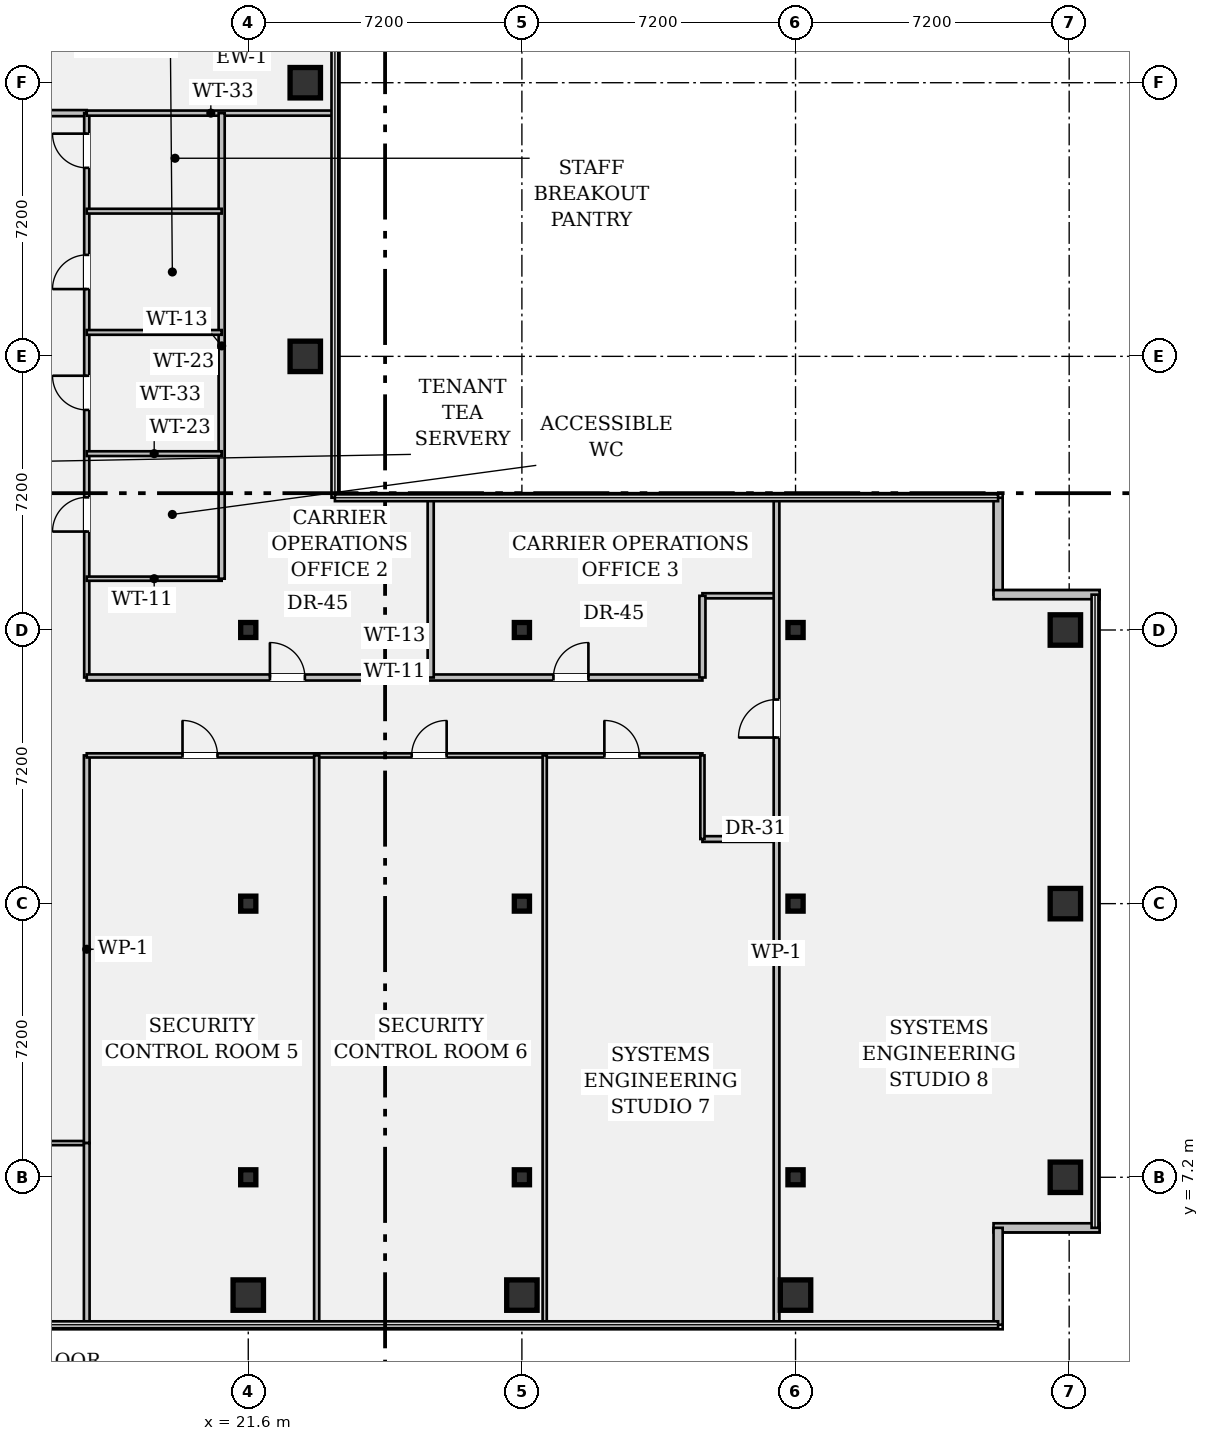
"""IFC4 building model, lengths in metres.
Left out: names, types, materials, properties, quantities, classifications, styles, units other than length and angle.
Written with IfcOpenShell. Run it as: python <this file> out.ifc"""

import sys

from ifc_helpers import new_model, si_unit, direction, frame, frame_2d, origin, origin_2d, place, context, subcontext, project, spatial, rectangle, hollow_rectangle, i_section, extrude, element, fill, save


model = new_model("IFC4")
c1 = context("Model", 3, precision=1e-05, world=origin(), true_north=direction((0.0, 1.0)))
c2 = subcontext(c1, "Body", "Model", "MODEL_VIEW")
j1 = project(units=[si_unit("LENGTHUNIT", "METRE"), si_unit("PLANEANGLEUNIT", "RADIAN")], contexts=[c1])
p1 = place(None, origin())
s1 = spatial("IfcSite", under=j1, at=p1, CompositionType="ELEMENT")
p2 = place(p1, origin())
s2 = spatial("IfcBuilding", under=s1, at=p2, CompositionType="ELEMENT")
p3 = place(p2, frame((0.0, 0.0, 187.25)))
s3 = spatial("IfcBuildingStorey", under=s2, at=p3, CompositionType="ELEMENT", Elevation=187.25)
p4 = place(p3, frame((21.6, 4.1, 0.0), z_axis=(0.0, 0.0, 1.0), x_axis=(1.0, 0.0, 0.0)))
e1 = element("IfcColumn", 1, at=p4, inside=s3, PredefinedType="COLUMN", context=c2, shape_type="SweptSolid", body=[
    extrude(hollow_rectangle(XDim=0.8, YDim=0.8, WallThickness=0.05, at=origin_2d()), origin(), (0.0, 0.0, 1.0), 3.24),
])
for number, where, z_axis, x_axis in (
    (2, (21.6, 7.2, 0.0), (0.0, 0.0, 1.0), (1.0, 0.0, 0.0)),
    (3, (21.6, 14.4, 0.0), (0.0, 0.0, 1.0), (1.0, 0.0, 0.0)),
    (4, (21.6, 21.6, 0.0), (0.0, 0.0, 1.0), (1.0, 0.0, 0.0)),
):
    element("IfcColumn", number, at=place(p3, frame(where, z_axis=z_axis, x_axis=x_axis)), inside=s3, PredefinedType="COLUMN", context=c2, shape_type="SweptSolid", body=[
        extrude(i_section(OverallWidth=0.399, OverallDepth=0.394, WebThickness=0.023, FlangeThickness=0.037, FilletRadius=0.018, at=origin_2d()), origin(), (0.0, 0.0, 1.0), 3.24),
    ])
for number, where, z_axis, x_axis in (
    (5, (23.1, 28.8, 0.0), (0.0, 0.0, 1.0), (1.0, 0.0, 0.0)),
    (6, (23.1, 36.0, 0.0), (0.0, 0.0, 1.0), (1.0, 0.0, 0.0)),
    (7, (28.8, 4.1, 0.0), (0.0, 0.0, 1.0), (1.0, 0.0, 0.0)),
):
    element("IfcColumn", number, at=place(p3, frame(where, z_axis=z_axis, x_axis=x_axis)), inside=s3, PredefinedType="COLUMN", context=c2, shape_type="SweptSolid", body=[
        extrude(hollow_rectangle(XDim=0.8, YDim=0.8, WallThickness=0.05, at=origin_2d()), origin(), (0.0, 0.0, 1.0), 3.24),
    ])
for number, where, z_axis, x_axis in (
    (8, (28.8, 7.2, 0.0), (0.0, 0.0, 1.0), (1.0, 0.0, 0.0)),
    (9, (28.8, 14.4, 0.0), (0.0, 0.0, 1.0), (1.0, 0.0, 0.0)),
    (10, (28.8, 21.6, 0.0), (0.0, 0.0, 1.0), (1.0, 0.0, 0.0)),
):
    element("IfcColumn", number, at=place(p3, frame(where, z_axis=z_axis, x_axis=x_axis)), inside=s3, PredefinedType="COLUMN", context=c2, shape_type="SweptSolid", body=[
        extrude(i_section(OverallWidth=0.399, OverallDepth=0.394, WebThickness=0.023, FlangeThickness=0.037, FilletRadius=0.018, at=origin_2d()), origin(), (0.0, 0.0, 1.0), 3.24),
    ])
p5 = place(p3, frame((36.0, 4.1, 0.0), z_axis=(0.0, 0.0, 1.0), x_axis=(1.0, 0.0, 0.0)))
e11 = element("IfcColumn", 11, at=p5, inside=s3, PredefinedType="COLUMN", context=c2, shape_type="SweptSolid", body=[
    extrude(hollow_rectangle(XDim=0.8, YDim=0.8, WallThickness=0.05, at=origin_2d()), origin(), (0.0, 0.0, 1.0), 3.24),
])
for number, where, z_axis, x_axis in (
    (12, (36.0, 7.2, 0.0), (0.0, 0.0, 1.0), (1.0, 0.0, 0.0)),
    (13, (36.0, 14.4, 0.0), (0.0, 0.0, 1.0), (1.0, 0.0, 0.0)),
    (14, (36.0, 21.6, 0.0), (0.0, 0.0, 1.0), (1.0, 0.0, 0.0)),
):
    element("IfcColumn", number, at=place(p3, frame(where, z_axis=z_axis, x_axis=x_axis)), inside=s3, PredefinedType="COLUMN", context=c2, shape_type="SweptSolid", body=[
        extrude(i_section(OverallWidth=0.399, OverallDepth=0.394, WebThickness=0.023, FlangeThickness=0.037, FilletRadius=0.018, at=origin_2d()), origin(), (0.0, 0.0, 1.0), 3.24),
    ])
for number, where, z_axis, x_axis in (
    (15, (43.1, 7.2, 0.0), (0.0, 0.0, 1.0), (1.0, 0.0, 0.0)),
    (16, (43.1, 14.4, 0.0), (0.0, 0.0, 1.0), (1.0, 0.0, 0.0)),
    (17, (43.1, 21.6, 0.0), (0.0, 0.0, 1.0), (1.0, 0.0, 0.0)),
):
    element("IfcColumn", number, at=place(p3, frame(where, z_axis=z_axis, x_axis=x_axis)), inside=s3, PredefinedType="COLUMN", context=c2, shape_type="SweptSolid", body=[
        extrude(hollow_rectangle(XDim=0.8, YDim=0.8, WallThickness=0.05, at=origin_2d()), origin(), (0.0, 0.0, 1.0), 3.24),
    ])
p6 = place(p3, frame((41.33, 25.08, 0.0), z_axis=(0.0, 0.0, 1.0), x_axis=(0.0, -1.0, 0.0)))
e18 = element("IfcWall", 18, at=p6, inside=s3, PredefinedType="STANDARD", context=c2, shape_type="SweptSolid", body=[
    extrude(rectangle(XDim=2.55, YDim=0.24, at=frame_2d((1.275, 0.0))), origin(), (0.0, 0.0, 1.0), 3.24),
])
for number, where, z_axis, x_axis in (
    (19, (41.21, 22.53, 0.0), (0.0, 0.0, 1.0), (1.0, 0.0, 0.0)),
    (20, (44.0, 5.87, 0.0), (0.0, 0.0, 1.0), (-1.0, 0.0, 0.0)),
):
    element("IfcWall", number, at=place(p3, frame(where, z_axis=z_axis, x_axis=x_axis)), inside=s3, PredefinedType="STANDARD", context=c2, shape_type="SweptSolid", body=[
        extrude(rectangle(XDim=2.79, YDim=0.24, at=frame_2d((1.395, 0.0))), origin(), (0.0, 0.0, 1.0), 3.24),
    ])
p7 = place(p3, frame((41.33, 5.87, 0.0), z_axis=(0.0, 0.0, 1.0), x_axis=(0.0, -1.0, 0.0)))
e21 = element("IfcWall", 21, at=p7, inside=s3, PredefinedType="STANDARD", context=c2, shape_type="SweptSolid", body=[
    extrude(rectangle(XDim=2.55, YDim=0.24, at=frame_2d((1.275, 0.0))), origin(), (0.0, 0.0, 1.0), 3.24),
])
p8 = place(p3, frame((14.4, 8.1, 0.0), z_axis=(0.0, 0.0, 1.0), x_axis=(1.0, 0.0, 0.0)))
e22 = element("IfcWall", 22, at=p8, inside=s3, PredefinedType="PARTITIONING", context=c2, shape_type="SweptSolid", body=[
    extrude(rectangle(XDim=2.95, YDim=0.11, at=frame_2d((1.475, 0.0))), origin(), (0.0, 0.0, 1.0), 2.808),
])
p9 = place(p8, frame((0.95, 0.0, 0.0)))
e23 = element("IfcOpeningElement", 23, at=p9, cuts=e22, PredefinedType="OPENING", context=c2, shape_type="SweptSolid", body=[
    extrude(rectangle(XDim=0.92, YDim=2.15, at=frame_2d((0.46, 1.075))), frame((0.0, 0.067, 0.0), z_axis=(0.0, -1.0, 0.0), x_axis=(1.0, 0.0, 0.0)), (0.0, 0.0, 1.0), 0.134),
])
p10 = place(p3, frame((14.4, 35.2, 0.0), z_axis=(0.0, 0.0, 1.0), x_axis=(1.0, 0.0, 0.0)))
e24 = element("IfcWall", 24, at=p10, inside=s3, PredefinedType="PARTITIONING", context=c2, shape_type="SweptSolid", body=[
    extrude(rectangle(XDim=2.95, YDim=0.16, at=frame_2d((1.475, 0.0))), origin(), (0.0, 0.0, 1.0), 2.808),
])
p11 = place(p10, frame((0.95, 0.0, 0.0)))
e25 = element("IfcOpeningElement", 25, at=p11, cuts=e24, PredefinedType="OPENING", context=c2, shape_type="SweptSolid", body=[
    extrude(rectangle(XDim=1.0, YDim=2.15, at=frame_2d((0.5, 1.075))), frame((0.0, 0.092, 0.0), z_axis=(0.0, -1.0, 0.0), x_axis=(1.0, 0.0, 0.0)), (0.0, 0.0, 1.0), 0.184),
])
p12 = place(p3, frame((17.35, 8.1, 0.0), z_axis=(0.0, 0.0, 1.0), x_axis=(0.0, 1.0, 0.0)))
e26 = element("IfcWall", 26, at=p12, inside=s3, PredefinedType="PARTITIONING", context=c2, shape_type="SweptSolid", body=[
    extrude(rectangle(XDim=10.2, YDim=0.15, at=frame_2d((5.1, 0.0))), origin(), (0.0, 0.0, 1.0), 2.603),
])
p13 = place(p3, frame((17.35, 20.35, 0.0), z_axis=(0.0, 0.0, 1.0), x_axis=(0.0, 1.0, 0.0)))
e27 = element("IfcWall", 27, at=p13, inside=s3, PredefinedType="PARTITIONING", context=c2, shape_type="SweptSolid", body=[
    extrude(rectangle(XDim=14.85, YDim=0.135, at=frame_2d((7.425, 0.0))), origin(), (0.0, 0.0, 1.0), 2.603),
])
p14 = place(p13, frame((3.84, 0.0, 0.0)))
e28 = element("IfcOpeningElement", 28, at=p14, cuts=e27, PredefinedType="OPENING", context=c2, shape_type="SweptSolid", body=[
    extrude(rectangle(XDim=0.9, YDim=2.15, at=frame_2d((0.45, 1.075))), frame((0.0, 0.08, 0.0), z_axis=(0.0, -1.0, 0.0), x_axis=(1.0, 0.0, 0.0)), (0.0, 0.0, 1.0), 0.159),
])
p15 = place(p13, frame((7.04, 0.0, 0.0)))
e29 = element("IfcOpeningElement", 29, at=p15, cuts=e27, PredefinedType="OPENING", context=c2, shape_type="SweptSolid", body=[
    extrude(rectangle(XDim=0.9, YDim=2.15, at=frame_2d((0.45, 1.075))), frame((0.0, 0.08, 0.0), z_axis=(0.0, -1.0, 0.0), x_axis=(1.0, 0.0, 0.0)), (0.0, 0.0, 1.0), 0.159),
])
p16 = place(p13, frame((10.22, 0.0, 0.0)))
e30 = element("IfcOpeningElement", 30, at=p16, cuts=e27, PredefinedType="OPENING", context=c2, shape_type="SweptSolid", body=[
    extrude(rectangle(XDim=0.9, YDim=2.15, at=frame_2d((0.45, 1.075))), frame((0.0, 0.08, 0.0), z_axis=(0.0, -1.0, 0.0), x_axis=(1.0, 0.0, 0.0)), (0.0, 0.0, 1.0), 0.159),
])
p17 = place(p13, frame((13.41, 0.0, 0.0)))
e31 = element("IfcOpeningElement", 31, at=p17, cuts=e27, PredefinedType="OPENING", context=c2, shape_type="SweptSolid", body=[
    extrude(rectangle(XDim=0.9, YDim=2.15, at=frame_2d((0.45, 1.075))), frame((0.0, 0.08, 0.0), z_axis=(0.0, -1.0, 0.0), x_axis=(1.0, 0.0, 0.0)), (0.0, 0.0, 1.0), 0.159),
])
p18 = place(p3, frame((17.35, 18.3, 0.0), z_axis=(0.0, 0.0, 1.0), x_axis=(1.0, 0.0, 0.0)))
e32 = element("IfcWall", 32, at=p18, inside=s3, PredefinedType="PARTITIONING", context=c2, shape_type="SweptSolid", body=[
    extrude(rectangle(XDim=16.2, YDim=0.11, at=frame_2d((8.1, 0.0))), origin(), (0.0, 0.0, 1.0), 2.603),
])
p19 = place(p18, frame((2.52, 0.0, 0.0)))
e33 = element("IfcOpeningElement", 33, at=p19, cuts=e32, PredefinedType="OPENING", context=c2, shape_type="SweptSolid", body=[
    extrude(rectangle(XDim=0.92, YDim=2.15, at=frame_2d((0.46, 1.075))), frame((0.0, 0.067, 0.0), z_axis=(0.0, -1.0, 0.0), x_axis=(1.0, 0.0, 0.0)), (0.0, 0.0, 1.0), 0.134),
])
p20 = place(p18, frame((8.55, 0.0, 0.0)))
e34 = element("IfcOpeningElement", 34, at=p20, cuts=e32, PredefinedType="OPENING", context=c2, shape_type="SweptSolid", body=[
    extrude(rectangle(XDim=0.92, YDim=2.15, at=frame_2d((0.46, 1.075))), frame((0.0, 0.067, 0.0), z_axis=(0.0, -1.0, 0.0), x_axis=(1.0, 0.0, 0.0)), (0.0, 0.0, 1.0), 0.134),
])
p21 = place(p18, frame((13.62, 0.0, 0.0)))
e35 = element("IfcOpeningElement", 35, at=p21, cuts=e32, PredefinedType="OPENING", context=c2, shape_type="SweptSolid", body=[
    extrude(rectangle(XDim=0.92, YDim=2.15, at=frame_2d((0.46, 1.075))), frame((0.0, 0.067, 0.0), z_axis=(0.0, -1.0, 0.0), x_axis=(1.0, 0.0, 0.0)), (0.0, 0.0, 1.0), 0.134),
])
p22 = place(p3, frame((17.35, 20.35, 0.0), z_axis=(0.0, 0.0, 1.0), x_axis=(1.0, 0.0, 0.0)))
e36 = element("IfcWall", 36, at=p22, inside=s3, PredefinedType="PARTITIONING", context=c2, shape_type="SweptSolid", body=[
    extrude(rectangle(XDim=16.2, YDim=0.16, at=frame_2d((8.1, 0.0))), origin(), (0.0, 0.0, 1.0), 2.603),
])
p23 = place(p22, frame((4.82, 0.0, 0.0)))
e37 = element("IfcOpeningElement", 37, at=p23, cuts=e36, PredefinedType="OPENING", context=c2, shape_type="SweptSolid", body=[
    extrude(rectangle(XDim=0.92, YDim=2.15, at=frame_2d((0.46, 1.075))), frame((0.0, 0.092, 0.0), z_axis=(0.0, -1.0, 0.0), x_axis=(1.0, 0.0, 0.0)), (0.0, 0.0, 1.0), 0.184),
])
p24 = place(p22, frame((12.28, 0.0, 0.0)))
e38 = element("IfcOpeningElement", 38, at=p24, cuts=e36, PredefinedType="OPENING", context=c2, shape_type="SweptSolid", body=[
    extrude(rectangle(XDim=0.92, YDim=2.15, at=frame_2d((0.46, 1.075))), frame((0.0, 0.092, 0.0), z_axis=(0.0, -1.0, 0.0), x_axis=(1.0, 0.0, 0.0)), (0.0, 0.0, 1.0), 0.184),
])
p25 = place(p3, frame((33.55, 16.1, 0.0), z_axis=(0.0, 0.0, 1.0), x_axis=(1.0, 0.0, 0.0)))
e39 = element("IfcWall", 39, at=p25, inside=s3, PredefinedType="PARTITIONING", context=c2, shape_type="SweptSolid", body=[
    extrude(rectangle(XDim=1.95, YDim=0.15, at=frame_2d((0.975, 0.0))), origin(), (0.0, 0.0, 1.0), 2.808),
])
p26 = place(p3, frame((33.55, 22.5, 0.0), z_axis=(0.0, 0.0, 1.0), x_axis=(1.0, 0.0, 0.0)))
e40 = element("IfcWall", 40, at=p26, inside=s3, PredefinedType="PARTITIONING", context=c2, shape_type="SweptSolid", body=[
    extrude(rectangle(XDim=1.95, YDim=0.135, at=frame_2d((0.975, 0.0))), origin(), (0.0, 0.0, 1.0), 3.24),
])
p27 = place(p3, frame((33.55, 16.1, 0.0), z_axis=(0.0, 0.0, 1.0), x_axis=(0.0, 1.0, 0.0)))
e41 = element("IfcWall", 41, at=p27, inside=s3, PredefinedType="PARTITIONING", context=c2, shape_type="SweptSolid", body=[
    extrude(rectangle(XDim=2.2, YDim=0.11, at=frame_2d((1.1, 0.0))), origin(), (0.0, 0.0, 1.0), 3.24),
])
p28 = place(p3, frame((33.55, 20.35, 0.0), z_axis=(0.0, 0.0, 1.0), x_axis=(0.0, 1.0, 0.0)))
e42 = element("IfcWall", 42, at=p28, inside=s3, PredefinedType="PARTITIONING", context=c2, shape_type="SweptSolid", body=[
    extrude(rectangle(XDim=2.15, YDim=0.16, at=frame_2d((1.075, 0.0))), origin(), (0.0, 0.0, 1.0), 2.603),
])
p29 = place(p3, frame((35.5, 3.32, 0.0), z_axis=(0.0, 0.0, 1.0), x_axis=(0.0, 1.0, 0.0)))
e43 = element("IfcWall", 43, at=p29, inside=s3, PredefinedType="PARTITIONING", context=c2, shape_type="SweptSolid", body=[
    extrude(rectangle(XDim=21.76, YDim=0.15, at=frame_2d((10.88, 0.0))), origin(), (0.0, 0.0, 1.0), 2.603),
])
p30 = place(p29, frame((15.45, 0.0, 0.0)))
e44 = element("IfcOpeningElement", 44, at=p30, cuts=e43, PredefinedType="OPENING", context=c2, shape_type="SweptSolid", body=[
    extrude(rectangle(XDim=1.0, YDim=2.15, at=frame_2d((0.5, 1.075))), frame((0.0, 0.087, 0.0), z_axis=(0.0, -1.0, 0.0), x_axis=(1.0, 0.0, 0.0)), (0.0, 0.0, 1.0), 0.174),
])
p31 = place(p3, frame((17.35, 35.2, 0.0), z_axis=(0.0, 0.0, 1.0), x_axis=(1.0, 0.0, 0.0)))
e45 = element("IfcWall", 45, at=p31, inside=s3, PredefinedType="PARTITIONING", context=c2, shape_type="SweptSolid", body=[
    extrude(rectangle(XDim=6.53, YDim=0.135, at=frame_2d((3.265, 0.0))), origin(), (0.0, 0.0, 1.0), 2.758),
])
p32 = place(p3, frame((17.35, 22.95, 0.0), z_axis=(0.0, 0.0, 1.0), x_axis=(1.0, 0.0, 0.0)))
e46 = element("IfcWall", 46, at=p32, inside=s3, PredefinedType="PARTITIONING", context=c2, shape_type="SweptSolid", body=[
    extrude(rectangle(XDim=3.55, YDim=0.11, at=frame_2d((1.775, 0.0))), origin(), (0.0, 0.0, 1.0), 2.808),
])
p33 = place(p3, frame((20.9, 22.95, 0.0), z_axis=(0.0, 0.0, 1.0), x_axis=(0.0, 1.0, 0.0)))
e47 = element("IfcWall", 47, at=p33, inside=s3, PredefinedType="PARTITIONING", context=c2, shape_type="SweptSolid", body=[
    extrude(rectangle(XDim=12.25, YDim=0.16, at=frame_2d((6.125, 0.0))), origin(), (0.0, 0.0, 1.0), 2.603),
])
for number, where, z_axis, x_axis in (
    (48, (17.35, 26.24, 0.0), (0.0, 0.0, 1.0), (1.0, 0.0, 0.0)),
    (49, (17.35, 29.43, 0.0), (0.0, 0.0, 1.0), (1.0, 0.0, 0.0)),
    (50, (17.35, 32.62, 0.0), (0.0, 0.0, 1.0), (1.0, 0.0, 0.0)),
):
    element("IfcWall", number, at=place(p3, frame(where, z_axis=z_axis, x_axis=x_axis)), inside=s3, PredefinedType="PARTITIONING", context=c2, shape_type="SweptSolid", body=[
        extrude(rectangle(XDim=3.55, YDim=0.125, at=frame_2d((1.775, 0.0))), origin(), (0.0, 0.0, 1.0), 2.808),
    ])
p34 = place(p3, frame((26.4, 20.35, 0.0), z_axis=(0.0, 0.0, 1.0), x_axis=(0.0, 1.0, 0.0)))
e51 = element("IfcWall", 51, at=p34, inside=s3, PredefinedType="PARTITIONING", context=c2, shape_type="SweptSolid", body=[
    extrude(rectangle(XDim=4.7, YDim=0.16, at=frame_2d((2.35, 0.0))), origin(), (0.0, 0.0, 1.0), 2.603),
])
p35 = place(p3, frame((17.35, 3.32, 0.0), z_axis=(0.0, 0.0, 1.0), x_axis=(0.0, 1.0, 0.0)))
e52 = element("IfcWall", 52, at=p35, inside=s3, PredefinedType="PARTITIONING", context=c2, shape_type="SweptSolid", body=[
    extrude(rectangle(XDim=4.78, YDim=0.15, at=frame_2d((2.39, 0.0))), origin(), (0.0, 0.0, 1.0), 2.603),
])
p36 = place(p3, frame((23.4, 3.32, 0.0), z_axis=(0.0, 0.0, 1.0), x_axis=(0.0, 1.0, 0.0)))
e53 = element("IfcWall", 53, at=p36, inside=s3, PredefinedType="PARTITIONING", context=c2, shape_type="SweptSolid", body=[
    extrude(rectangle(XDim=14.98, YDim=0.135, at=frame_2d((7.49, 0.0))), origin(), (0.0, 0.0, 1.0), 2.603),
])
p37 = place(p3, frame((29.4, 3.32, 0.0), z_axis=(0.0, 0.0, 1.0), x_axis=(0.0, 1.0, 0.0)))
e54 = element("IfcWall", 54, at=p37, inside=s3, PredefinedType="PARTITIONING", context=c2, shape_type="SweptSolid", body=[
    extrude(rectangle(XDim=14.98, YDim=0.11, at=frame_2d((7.49, 0.0))), origin(), (0.0, 0.0, 1.0), 2.603),
])
p38 = place(p14, origin())
e55 = element("IfcDoor", 55, at=p38, inside=s3, OperationType="SINGLE_SWING_LEFT", PredefinedType="DOOR", context=c2, shape_type="SweptSolid", body=[
    extrude(rectangle(XDim=0.9, YDim=2.15, at=frame_2d((0.45, 1.075))), frame((0.0, 0.025, 0.0), z_axis=(0.0, -1.0, 0.0), x_axis=(1.0, 0.0, 0.0)), (0.0, 0.0, 1.0), 0.05),
])
fill(e28, e55)
p39 = place(p15, origin())
e56 = element("IfcDoor", 56, at=p39, inside=s3, OperationType="SINGLE_SWING_RIGHT", PredefinedType="DOOR", context=c2, shape_type="SweptSolid", body=[
    extrude(rectangle(XDim=0.9, YDim=2.15, at=frame_2d((0.45, 1.075))), frame((0.0, 0.025, 0.0), z_axis=(0.0, -1.0, 0.0), x_axis=(1.0, 0.0, 0.0)), (0.0, 0.0, 1.0), 0.05),
])
fill(e29, e56)
p40 = place(p16, origin())
e57 = element("IfcDoor", 57, at=p40, inside=s3, OperationType="SINGLE_SWING_LEFT", PredefinedType="DOOR", context=c2, shape_type="SweptSolid", body=[
    extrude(rectangle(XDim=0.9, YDim=2.15, at=frame_2d((0.45, 1.075))), frame((0.0, 0.025, 0.0), z_axis=(0.0, -1.0, 0.0), x_axis=(1.0, 0.0, 0.0)), (0.0, 0.0, 1.0), 0.05),
])
fill(e30, e57)
p41 = place(p17, origin())
e58 = element("IfcDoor", 58, at=p41, inside=s3, OperationType="SINGLE_SWING_RIGHT", PredefinedType="DOOR", context=c2, shape_type="SweptSolid", body=[
    extrude(rectangle(XDim=0.9, YDim=2.15, at=frame_2d((0.45, 1.075))), frame((0.0, 0.025, 0.0), z_axis=(0.0, -1.0, 0.0), x_axis=(1.0, 0.0, 0.0)), (0.0, 0.0, 1.0), 0.05),
])
fill(e31, e58)
p42 = place(p23, origin())
e59 = element("IfcDoor", 59, at=p42, inside=s3, OperationType="SINGLE_SWING_LEFT", PredefinedType="DOOR", context=c2, shape_type="SweptSolid", body=[
    extrude(rectangle(XDim=0.92, YDim=2.15, at=frame_2d((0.46, 1.075))), frame((0.0, 0.025, 0.0), z_axis=(0.0, -1.0, 0.0), x_axis=(1.0, 0.0, 0.0)), (0.0, 0.0, 1.0), 0.05),
])
fill(e37, e59)
p43 = place(p24, origin())
e60 = element("IfcDoor", 60, at=p43, inside=s3, OperationType="SINGLE_SWING_RIGHT", PredefinedType="DOOR", context=c2, shape_type="SweptSolid", body=[
    extrude(rectangle(XDim=0.92, YDim=2.15, at=frame_2d((0.46, 1.075))), frame((0.0, 0.025, 0.0), z_axis=(0.0, -1.0, 0.0), x_axis=(1.0, 0.0, 0.0)), (0.0, 0.0, 1.0), 0.05),
])
fill(e38, e60)
p44 = place(p19, origin())
e61 = element("IfcDoor", 61, at=p44, inside=s3, OperationType="SINGLE_SWING_LEFT", PredefinedType="DOOR", context=c2, shape_type="SweptSolid", body=[
    extrude(rectangle(XDim=0.92, YDim=2.15, at=frame_2d((0.46, 1.075))), frame((0.0, 0.025, 0.0), z_axis=(0.0, -1.0, 0.0), x_axis=(1.0, 0.0, 0.0)), (0.0, 0.0, 1.0), 0.05),
])
fill(e33, e61)
p45 = place(p20, origin())
e62 = element("IfcDoor", 62, at=p45, inside=s3, OperationType="SINGLE_SWING_RIGHT", PredefinedType="DOOR", context=c2, shape_type="SweptSolid", body=[
    extrude(rectangle(XDim=0.92, YDim=2.15, at=frame_2d((0.46, 1.075))), frame((0.0, 0.025, 0.0), z_axis=(0.0, -1.0, 0.0), x_axis=(1.0, 0.0, 0.0)), (0.0, 0.0, 1.0), 0.05),
])
fill(e34, e62)
p46 = place(p21, origin())
e63 = element("IfcDoor", 63, at=p46, inside=s3, OperationType="SINGLE_SWING_LEFT", PredefinedType="DOOR", context=c2, shape_type="SweptSolid", body=[
    extrude(rectangle(XDim=0.92, YDim=2.15, at=frame_2d((0.46, 1.075))), frame((0.0, 0.025, 0.0), z_axis=(0.0, -1.0, 0.0), x_axis=(1.0, 0.0, 0.0)), (0.0, 0.0, 1.0), 0.05),
])
fill(e35, e63)
p47 = place(p30, origin())
e64 = element("IfcDoor", 64, at=p47, inside=s3, OperationType="SINGLE_SWING_LEFT", PredefinedType="DOOR", context=c2, shape_type="SweptSolid", body=[
    extrude(rectangle(XDim=1.0, YDim=2.15, at=frame_2d((0.5, 1.075))), frame((0.0, 0.025, 0.0), z_axis=(0.0, -1.0, 0.0), x_axis=(1.0, 0.0, 0.0)), (0.0, 0.0, 1.0), 0.05),
])
fill(e44, e64)
save(model, sys.argv[1])
